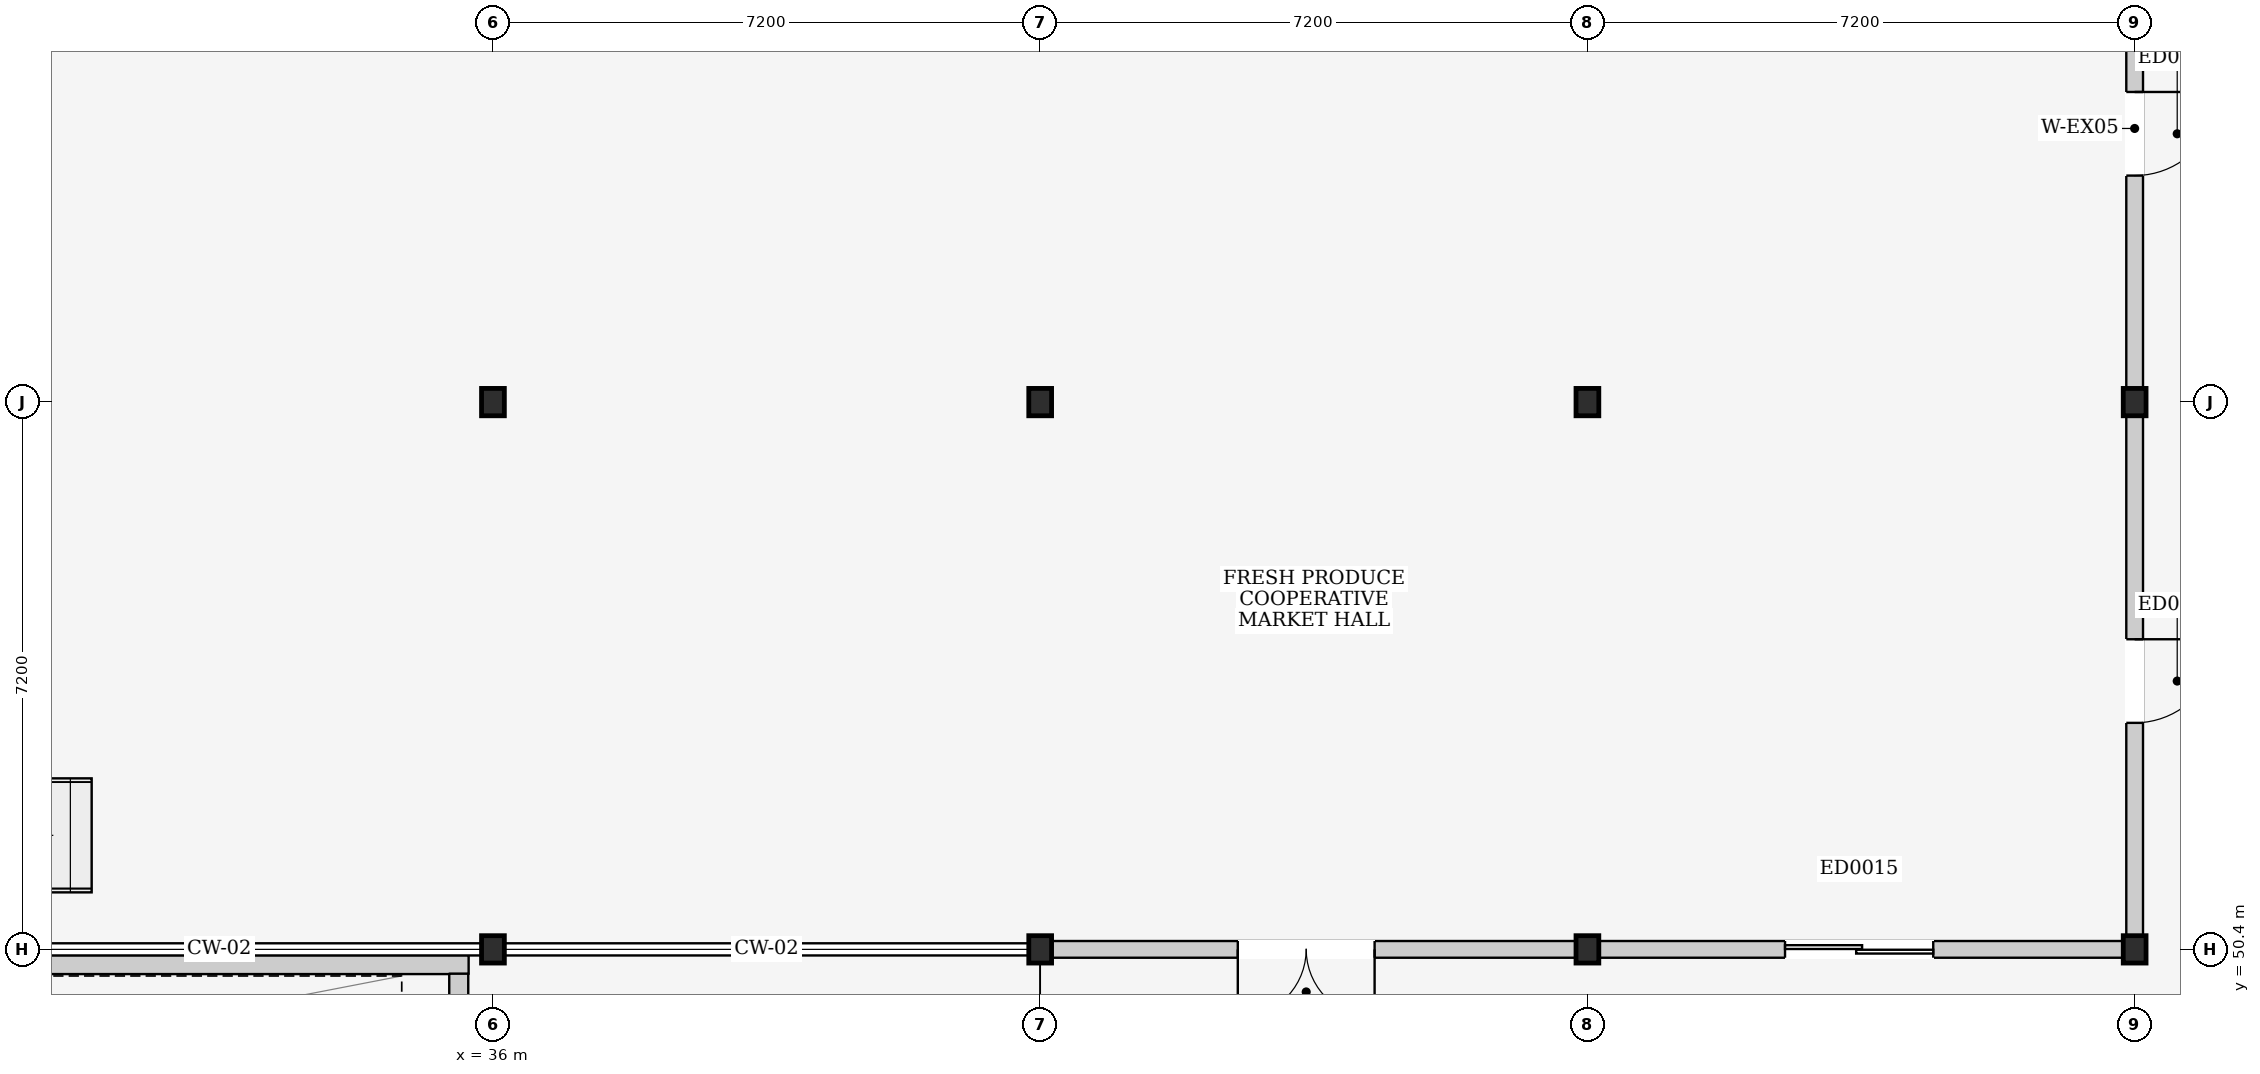
"""IFC4 building model, lengths in metres.
Left out: names, types, materials, properties, quantities, classifications, styles, units other than length and angle.
Written with IfcOpenShell. Run it as: python <this file> out.ifc"""

import sys

from ifc_helpers import new_model, si_unit, direction, frame, frame_2d, origin, origin_2d, place, context, subcontext, project, spatial, rectangle, i_section, extrude, element, fill, save


model = new_model("IFC4")
c1 = context("Model", 3, precision=1e-05, world=origin(), true_north=direction((0.0, 1.0)))
c2 = subcontext(c1, "Body", "Model", "MODEL_VIEW")
j1 = project(units=[si_unit("LENGTHUNIT", "METRE"), si_unit("PLANEANGLEUNIT", "RADIAN")], contexts=[c1])
p1 = place(None, origin())
s1 = spatial("IfcSite", under=j1, at=p1, CompositionType="ELEMENT")
p2 = place(p1, origin())
s2 = spatial("IfcBuilding", under=s1, at=p2, CompositionType="ELEMENT")
p3 = place(p2, origin())
s3 = spatial("IfcBuildingStorey", under=s2, at=p3, CompositionType="ELEMENT", Elevation=0.0)
for number, where, z_axis, x_axis in (
    (1, (36.0, 50.4, 0.0), (0.0, 0.0, 1.0), (1.0, 0.0, 0.0)),
    (2, (36.0, 57.6, 0.0), (0.0, 0.0, 1.0), (1.0, 0.0, 0.0)),
    (3, (43.2, 50.4, 0.0), (0.0, 0.0, 1.0), (1.0, 0.0, 0.0)),
    (4, (43.2, 57.6, 0.0), (0.0, 0.0, 1.0), (1.0, 0.0, 0.0)),
    (5, (50.4, 50.4, 0.0), (0.0, 0.0, 1.0), (1.0, 0.0, 0.0)),
    (6, (50.4, 57.6, 0.0), (0.0, 0.0, 1.0), (1.0, 0.0, 0.0)),
    (7, (57.6, 50.4, 0.0), (0.0, 0.0, 1.0), (1.0, 0.0, 0.0)),
    (8, (57.6, 57.6, 0.0), (0.0, 0.0, 1.0), (1.0, 0.0, 0.0)),
):
    element("IfcColumn", number, at=place(p3, frame(where, z_axis=z_axis, x_axis=x_axis)), inside=s3, PredefinedType="COLUMN", context=c2, shape_type="SweptSolid", body=[
        extrude(i_section(OverallWidth=0.3, OverallDepth=0.36, WebThickness=0.012, FlangeThickness=0.022, at=origin_2d()), origin(), (0.0, 0.0, 1.0), 4.5),
    ])
p4 = place(p3, frame((0.14, 50.2, 0.0), z_axis=(0.0, 0.0, 1.0), x_axis=(1.0, 0.0, 0.0)))
e9 = element("IfcWall", 9, at=p4, inside=s3, PredefinedType="SOLIDWALL", context=c2, shape_type="SweptSolid", body=[
    extrude(rectangle(XDim=35.54, YDim=0.25, at=frame_2d((17.77, 0.0))), origin(), (0.0, 0.0, 1.0), 3.585),
])
p5 = place(p3, frame((35.55, 43.52, 0.0), z_axis=(0.0, 0.0, 1.0), x_axis=(0.0, 1.0, 0.0)))
e10 = element("IfcWall", 10, at=p5, inside=s3, PredefinedType="SOLIDWALL", context=c2, shape_type="SweptSolid", body=[
    extrude(rectangle(XDim=6.56, YDim=0.25, at=frame_2d((3.28, 0.0))), origin(), (0.0, 0.0, 1.0), 3.7),
])
p6 = place(p3, frame((43.35, 50.4, 0.0), z_axis=(0.0, 0.0, 1.0), x_axis=(1.0, 0.0, 0.0)))
e11 = element("IfcWall", 11, at=p6, inside=s3, PredefinedType="ELEMENTEDWALL", context=c2, shape_type="SweptSolid", body=[
    extrude(rectangle(XDim=6.9, YDim=0.22, at=frame_2d((3.45, 0.0))), origin(), (0.0, 0.0, 1.0), 3.55),
])
p7 = place(p6, frame((2.45, 0.0, 0.0)))
e12 = element("IfcOpeningElement", 12, at=p7, cuts=e11, PredefinedType="OPENING", context=c2, shape_type="SweptSolid", body=[
    extrude(rectangle(XDim=1.8, YDim=2.3, at=frame_2d((0.9, 1.15))), frame((0.0, 0.125, 0.0), z_axis=(0.0, -1.0, 0.0), x_axis=(1.0, 0.0, 0.0)), (0.0, 0.0, 1.0), 0.25),
])
p8 = place(p3, frame((50.55, 50.4, 0.0), z_axis=(0.0, 0.0, 1.0), x_axis=(1.0, 0.0, 0.0)))
e13 = element("IfcWall", 13, at=p8, inside=s3, PredefinedType="ELEMENTEDWALL", context=c2, shape_type="SweptSolid", body=[
    extrude(rectangle(XDim=6.9, YDim=0.22, at=frame_2d((3.45, 0.0))), origin(), (0.0, 0.0, 1.0), 3.55),
])
p9 = place(p8, frame((2.45, 0.0, 0.0)))
e14 = element("IfcOpeningElement", 14, at=p9, cuts=e13, PredefinedType="OPENING", context=c2, shape_type="SweptSolid", body=[
    extrude(rectangle(XDim=1.95, YDim=2.3, at=frame_2d((0.975, 1.15))), frame((0.0, 0.125, 0.0), z_axis=(0.0, -1.0, 0.0), x_axis=(1.0, 0.0, 0.0)), (0.0, 0.0, 1.0), 0.25),
])
p10 = place(p3, frame((57.6, 50.58, 0.0), z_axis=(0.0, 0.0, 1.0), x_axis=(0.0, 1.0, 0.0)))
e15 = element("IfcWall", 15, at=p10, inside=s3, PredefinedType="ELEMENTEDWALL", context=c2, shape_type="SweptSolid", body=[
    extrude(rectangle(XDim=6.84, YDim=0.22, at=frame_2d((3.42, 0.0))), origin(), (0.0, 0.0, 1.0), 3.585),
])
p11 = place(p10, frame((2.8, 0.0, 0.0)))
e16 = element("IfcOpeningElement", 16, at=p11, cuts=e15, PredefinedType="OPENING", context=c2, shape_type="SweptSolid", body=[
    extrude(rectangle(XDim=1.1, YDim=2.2, at=frame_2d((0.55, 1.1))), frame((0.0, 0.125, 0.0), z_axis=(0.0, -1.0, 0.0), x_axis=(1.0, 0.0, 0.0)), (0.0, 0.0, 1.0), 0.25),
])
p12 = place(p3, frame((57.6, 57.78, 0.0), z_axis=(0.0, 0.0, 1.0), x_axis=(0.0, 1.0, 0.0)))
e17 = element("IfcWall", 17, at=p12, inside=s3, PredefinedType="ELEMENTEDWALL", context=c2, shape_type="SweptSolid", body=[
    extrude(rectangle(XDim=6.84, YDim=0.22, at=frame_2d((3.42, 0.0))), origin(), (0.0, 0.0, 1.0), 3.585),
])
p13 = place(p12, frame((2.8, 0.0, 0.0)))
e18 = element("IfcOpeningElement", 18, at=p13, cuts=e17, PredefinedType="OPENING", context=c2, shape_type="SweptSolid", body=[
    extrude(rectangle(XDim=1.1, YDim=2.2, at=frame_2d((0.55, 1.1))), frame((0.0, 0.125, 0.0), z_axis=(0.0, -1.0, 0.0), x_axis=(1.0, 0.0, 0.0)), (0.0, 0.0, 1.0), 0.25),
])
p14 = place(p7, frame((1.8, 0.0, 0.0), z_axis=(0.0, 0.0, 1.0), x_axis=(-1.0, 0.0, 0.0)))
e19 = element("IfcDoor", 19, at=p14, inside=s3, OperationType="DOUBLE_DOOR_SINGLE_SWING", PredefinedType="DOOR", context=c2, shape_type="SweptSolid", body=[
    extrude(rectangle(XDim=1.8, YDim=2.3, at=frame_2d((0.9, 1.15))), frame((0.0, 0.025, 0.0), z_axis=(0.0, -1.0, 0.0), x_axis=(1.0, 0.0, 0.0)), (0.0, 0.0, 1.0), 0.05),
])
fill(e12, e19)
p15 = place(p9, frame((1.95, 0.0, 0.0), z_axis=(0.0, 0.0, 1.0), x_axis=(-1.0, 0.0, 0.0)))
e20 = element("IfcDoor", 20, at=p15, inside=s3, OperationType="DOUBLE_DOOR_SLIDING", PredefinedType="DOOR", context=c2, shape_type="SweptSolid", body=[
    extrude(rectangle(XDim=1.95, YDim=2.3, at=frame_2d((0.975, 1.15))), frame((0.0, 0.025, 0.0), z_axis=(0.0, -1.0, 0.0), x_axis=(1.0, 0.0, 0.0)), (0.0, 0.0, 1.0), 0.05),
])
fill(e14, e20)
p16 = place(p11, frame((1.1, 0.0, 0.0), z_axis=(0.0, 0.0, 1.0), x_axis=(-1.0, 0.0, 0.0)))
e21 = element("IfcDoor", 21, at=p16, inside=s3, OperationType="SINGLE_SWING_LEFT", PredefinedType="DOOR", context=c2, shape_type="SweptSolid", body=[
    extrude(rectangle(XDim=1.1, YDim=2.2, at=frame_2d((0.55, 1.1))), frame((0.0, 0.025, 0.0), z_axis=(0.0, -1.0, 0.0), x_axis=(1.0, 0.0, 0.0)), (0.0, 0.0, 1.0), 0.05),
])
fill(e16, e21)
p17 = place(p13, frame((1.1, 0.0, 0.0), z_axis=(0.0, 0.0, 1.0), x_axis=(-1.0, 0.0, 0.0)))
e22 = element("IfcDoor", 22, at=p17, inside=s3, OperationType="SINGLE_SWING_LEFT", PredefinedType="DOOR", context=c2, shape_type="SweptSolid", body=[
    extrude(rectangle(XDim=1.1, YDim=2.2, at=frame_2d((0.55, 1.1))), frame((0.0, 0.025, 0.0), z_axis=(0.0, -1.0, 0.0), x_axis=(1.0, 0.0, 0.0)), (0.0, 0.0, 1.0), 0.05),
])
fill(e18, e22)
save(model, sys.argv[1])
